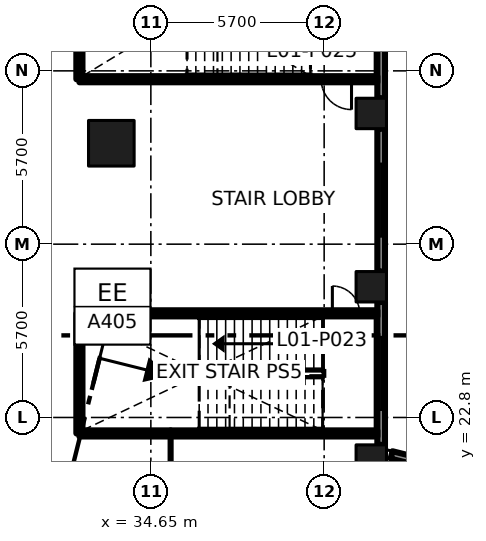
"""IFC4 building model, lengths in metres.
Left out: names, types, materials, properties, quantities, classifications, styles, units other than length and angle.
Written with IfcOpenShell. Run it as: python <this file> out.ifc"""

import sys

from ifc_helpers import new_model, si_unit, direction, frame, frame_2d, origin, origin_2d, place, context, subcontext, project, spatial, rectangle, extrude, element, fill, save


model = new_model("IFC4")
c1 = context("Model", 3, precision=1e-05, world=origin(), true_north=direction((0.0, 1.0)))
c2 = subcontext(c1, "Body", "Model", "MODEL_VIEW")
j1 = project(units=[si_unit("LENGTHUNIT", "METRE"), si_unit("PLANEANGLEUNIT", "RADIAN")], contexts=[c1])
p1 = place(None, origin())
s1 = spatial("IfcSite", under=j1, at=p1, CompositionType="ELEMENT")
p2 = place(p1, origin())
s2 = spatial("IfcBuilding", under=s1, at=p2, CompositionType="ELEMENT")
p3 = place(p2, frame((0.0, 0.0, 7.2)))
s3 = spatial("IfcBuildingStorey", under=s2, at=p3, CompositionType="ELEMENT", Elevation=7.2)
for number, where, z_axis, x_axis in (
    (1, (33.35, 26.119, 0.0), (0.0, 0.0, 1.0), (1.0, 0.0, 0.0)),
    (2, (33.35, 31.819, 0.0), (0.0, 0.0, 1.0), (1.0, 0.0, 0.0)),
):
    element("IfcColumn", number, at=place(p3, frame(where, z_axis=z_axis, x_axis=x_axis)), inside=s3, PredefinedType="COLUMN", context=c2, shape_type="SweptSolid", body=[
        extrude(rectangle(XDim=1.5, YDim=1.5, at=origin_2d()), origin(), (0.0, 0.0, 1.0), 5.4),
    ])
for number, where, z_axis, x_axis in (
    (3, (41.9, 21.399, 0.0), (0.0, 0.0, 1.0), (1.0, 0.0, 0.0)),
    (4, (41.9, 27.099, 0.0), (0.0, 0.0, 1.0), (1.0, 0.0, 0.0)),
    (5, (41.9, 32.799, 0.0), (0.0, 0.0, 1.0), (1.0, 0.0, 0.0)),
):
    element("IfcColumn", number, at=place(p3, frame(where, z_axis=z_axis, x_axis=x_axis)), inside=s3, PredefinedType="COLUMN", context=c2, shape_type="SweptSolid", body=[
        extrude(rectangle(XDim=1.0, YDim=1.0, at=origin_2d()), origin(), (0.0, 0.0, 1.0), 5.4),
    ])
p4 = place(p3, frame((32.3, 22.275, 0.0), z_axis=(0.0, 0.0, 1.0), x_axis=(0.0, 1.0, 0.0)))
e6 = element("IfcWall", 6, at=p4, inside=s3, PredefinedType="SOLIDWALL", context=c2, shape_type="SweptSolid", body=[
    extrude(rectangle(XDim=3.95, YDim=0.2, at=frame_2d((1.975, 0.0))), origin(), (0.0, 0.0, 1.0), 4.95),
])
p5 = place(p3, frame((32.3, 33.925, 0.0), z_axis=(0.0, 0.0, 1.0), x_axis=(0.0, 1.0, 0.0)))
e7 = element("IfcWall", 7, at=p5, inside=s3, PredefinedType="SOLIDWALL", context=c2, shape_type="SweptSolid", body=[
    extrude(rectangle(XDim=4.75, YDim=0.2, at=frame_2d((2.375, 0.0))), origin(), (0.0, 0.0, 1.0), 4.95),
])
p6 = place(p3, frame((34.12, 26.225, 0.0), z_axis=(0.0, 0.0, 1.0), x_axis=(1.0, 0.0, 0.0)))
e8 = element("IfcWall", 8, at=p6, inside=s3, PredefinedType="SOLIDWALL", context=c2, shape_type="SweptSolid", body=[
    extrude(rectangle(XDim=7.98, YDim=0.2, at=frame_2d((3.99, 0.0))), origin(), (0.0, 0.0, 1.0), 4.95),
])
p7 = place(p6, frame((6.5, 0.0, 0.0)))
e9 = element("IfcOpeningElement", 9, at=p7, cuts=e8, PredefinedType="OPENING", context=c2, shape_type="SweptSolid", body=[
    extrude(rectangle(XDim=0.9, YDim=2.1, at=frame_2d((0.45, 1.05))), frame((0.0, 0.11, 0.0), z_axis=(0.0, -1.0, 0.0), x_axis=(1.0, 0.0, 0.0)), (0.0, 0.0, 1.0), 0.22),
])
p8 = place(p3, frame((35.3, 10.073, 0.0), z_axis=(0.0, 0.0, 1.0), x_axis=(0.0, 1.0, 0.0)))
e10 = element("IfcWall", 10, at=p8, inside=s3, PredefinedType="PARTITIONING", context=c2, shape_type="SweptSolid", body=[
    extrude(rectangle(XDim=12.202, YDim=0.1, at=frame_2d((6.101, 0.0))), origin(), (0.0, 0.0, 1.0), 4.95),
])
p9 = place(p8, frame((7.907, 0.0, 0.0)))
e11 = element("IfcOpeningElement", 11, at=p9, cuts=e10, PredefinedType="OPENING", context=c2, shape_type="SweptSolid", body=[
    extrude(rectangle(XDim=1.0, YDim=2.1, at=frame_2d((0.5, 1.05))), frame((0.0, 0.06, 0.0), z_axis=(0.0, -1.0, 0.0), x_axis=(1.0, 0.0, 0.0)), (0.0, 0.0, 1.0), 0.12),
])
p10 = place(p3, frame((35.3, 22.275, 0.0), z_axis=(0.0, 0.0, 1.0), x_axis=(-1.0, 0.0, 0.0)))
e12 = element("IfcWall", 12, at=p10, inside=s3, PredefinedType="SOLIDWALL", context=c2, shape_type="SweptSolid", body=[
    extrude(rectangle(XDim=3.0, YDim=0.2, at=frame_2d((1.5, 0.0))), origin(), (0.0, 0.0, 1.0), 4.95),
])
p11 = place(p3, frame((42.1, 33.925, 0.0), z_axis=(0.0, 0.0, 1.0), x_axis=(-1.0, 0.0, 0.0)))
e13 = element("IfcWall", 13, at=p11, inside=s3, PredefinedType="SOLIDWALL", context=c2, shape_type="SweptSolid", body=[
    extrude(rectangle(XDim=9.8, YDim=0.2, at=frame_2d((4.9, 0.0))), origin(), (0.0, 0.0, 1.0), 4.95),
])
p12 = place(p11, frame((0.85, 0.0, 0.0)))
e14 = element("IfcOpeningElement", 14, at=p12, cuts=e13, PredefinedType="OPENING", context=c2, shape_type="SweptSolid", body=[
    extrude(rectangle(XDim=1.0, YDim=2.1, at=frame_2d((0.5, 1.05))), frame((0.0, 0.11, 0.0), z_axis=(0.0, -1.0, 0.0), x_axis=(1.0, 0.0, 0.0)), (0.0, 0.0, 1.0), 0.22),
])
p13 = place(p3, frame((35.3, 22.275, 0.0), z_axis=(0.0, 0.0, 1.0), x_axis=(1.0, 0.0, 0.0)))
e15 = element("IfcWall", 15, at=p13, inside=s3, PredefinedType="SOLIDWALL", context=c2, shape_type="SweptSolid", body=[
    extrude(rectangle(XDim=6.8, YDim=0.2, at=frame_2d((3.4, 0.0))), origin(), (0.0, 0.0, 1.0), 4.95),
])
p14 = place(p3, frame((46.922, 20.482, 0.0), z_axis=(0.0, 0.0, 1.0), x_axis=(-0.970279921141, 0.241985277715, 0.0)))
e16 = element("IfcWall", 16, at=p14, inside=s3, PredefinedType="SOLIDWALL", context=c2, shape_type="SweptSolid", body=[
    extrude(rectangle(XDim=4.489, YDim=0.25, at=frame_2d((2.244, 0.0))), origin(), (0.0, 0.0, 1.0), 4.05),
])
p15 = place(p14, frame((1.397, 0.0, 0.9)))
e17 = element("IfcOpeningElement", 17, at=p15, cuts=e16, PredefinedType="OPENING", context=c2, shape_type="SweptSolid", body=[
    extrude(rectangle(XDim=2.4, YDim=2.7, at=frame_2d((1.2, 1.35))), frame((0.0, 0.135, 0.0), z_axis=(0.0, -1.0, 0.0), x_axis=(1.0, 0.0, 0.0)), (0.0, 0.0, 1.0), 0.27),
])
p16 = place(p3, frame((42.225, 21.899, 0.0), z_axis=(0.0, 0.0, 1.0), x_axis=(0.0, 1.0, 0.0)))
e18 = element("IfcWall", 18, at=p16, inside=s3, PredefinedType="SOLIDWALL", context=c2, shape_type="SweptSolid", body=[
    extrude(rectangle(XDim=4.7, YDim=0.25, at=frame_2d((2.35, 0.0))), origin(), (0.0, 0.0, 1.0), 4.05),
])
p17 = place(p16, frame((1.15, 0.0, 0.9)))
e19 = element("IfcOpeningElement", 19, at=p17, cuts=e18, PredefinedType="OPENING", context=c2, shape_type="SweptSolid", body=[
    extrude(rectangle(XDim=2.4, YDim=2.7, at=frame_2d((1.2, 1.35))), frame((0.0, 0.135, 0.0), z_axis=(0.0, -1.0, 0.0), x_axis=(1.0, 0.0, 0.0)), (0.0, 0.0, 1.0), 0.27),
])
p18 = place(p3, frame((42.225, 27.599, 0.0), z_axis=(0.0, 0.0, 1.0), x_axis=(0.0, 1.0, 0.0)))
e20 = element("IfcWall", 20, at=p18, inside=s3, PredefinedType="SOLIDWALL", context=c2, shape_type="SweptSolid", body=[
    extrude(rectangle(XDim=4.7, YDim=0.25, at=frame_2d((2.35, 0.0))), origin(), (0.0, 0.0, 1.0), 4.05),
])
p19 = place(p18, frame((1.15, 0.0, 0.9)))
e21 = element("IfcOpeningElement", 21, at=p19, cuts=e20, PredefinedType="OPENING", context=c2, shape_type="SweptSolid", body=[
    extrude(rectangle(XDim=2.4, YDim=2.7, at=frame_2d((1.2, 1.35))), frame((0.0, 0.135, 0.0), z_axis=(0.0, -1.0, 0.0), x_axis=(1.0, 0.0, 0.0)), (0.0, 0.0, 1.0), 0.27),
])
p20 = place(p3, frame((42.225, 33.299, 0.0), z_axis=(0.0, 0.0, 1.0), x_axis=(0.0, 1.0, 0.0)))
e22 = element("IfcWall", 22, at=p20, inside=s3, PredefinedType="SOLIDWALL", context=c2, shape_type="SweptSolid", body=[
    extrude(rectangle(XDim=6.037, YDim=0.25, at=frame_2d((3.019, 0.0))), origin(), (0.0, 0.0, 1.0), 4.05),
])
p21 = place(p20, frame((1.819, 0.0, 0.9)))
e23 = element("IfcOpeningElement", 23, at=p21, cuts=e22, PredefinedType="OPENING", context=c2, shape_type="SweptSolid", body=[
    extrude(rectangle(XDim=2.4, YDim=2.7, at=frame_2d((1.2, 1.35))), frame((0.0, 0.135, 0.0), z_axis=(0.0, -1.0, 0.0), x_axis=(1.0, 0.0, 0.0)), (0.0, 0.0, 1.0), 0.27),
])
p22 = place(p7, origin())
e24 = element("IfcDoor", 24, at=p22, inside=s3, OperationType="SINGLE_SWING_LEFT", PredefinedType="DOOR", context=c2, shape_type="SweptSolid", body=[
    extrude(rectangle(XDim=0.9, YDim=2.1, at=frame_2d((0.45, 1.05))), frame((0.0, 0.025, 0.0), z_axis=(0.0, -1.0, 0.0), x_axis=(1.0, 0.0, 0.0)), (0.0, 0.0, 1.0), 0.05),
])
fill(e9, e24)
p23 = place(p12, origin())
e25 = element("IfcDoor", 25, at=p23, inside=s3, OperationType="SINGLE_SWING_LEFT", PredefinedType="DOOR", context=c2, shape_type="SweptSolid", body=[
    extrude(rectangle(XDim=1.0, YDim=2.1, at=frame_2d((0.5, 1.05))), frame((0.0, 0.025, 0.0), z_axis=(0.0, -1.0, 0.0), x_axis=(1.0, 0.0, 0.0)), (0.0, 0.0, 1.0), 0.05),
])
fill(e14, e25)
p24 = place(p17, origin())
e26 = element("IfcWindow", 26, at=p24, inside=s3, PartitioningType="DOUBLE_PANEL_VERTICAL", PredefinedType="WINDOW", context=c2, shape_type="SweptSolid", body=[
    extrude(rectangle(XDim=2.4, YDim=2.7, at=frame_2d((1.2, 1.35))), frame((0.0, 0.03, 0.0), z_axis=(0.0, -1.0, 0.0), x_axis=(1.0, 0.0, 0.0)), (0.0, 0.0, 1.0), 0.06),
])
fill(e19, e26)
p25 = place(p19, origin())
e27 = element("IfcWindow", 27, at=p25, inside=s3, PartitioningType="DOUBLE_PANEL_VERTICAL", PredefinedType="WINDOW", context=c2, shape_type="SweptSolid", body=[
    extrude(rectangle(XDim=2.4, YDim=2.7, at=frame_2d((1.2, 1.35))), frame((0.0, 0.03, 0.0), z_axis=(0.0, -1.0, 0.0), x_axis=(1.0, 0.0, 0.0)), (0.0, 0.0, 1.0), 0.06),
])
fill(e21, e27)
save(model, sys.argv[1])
